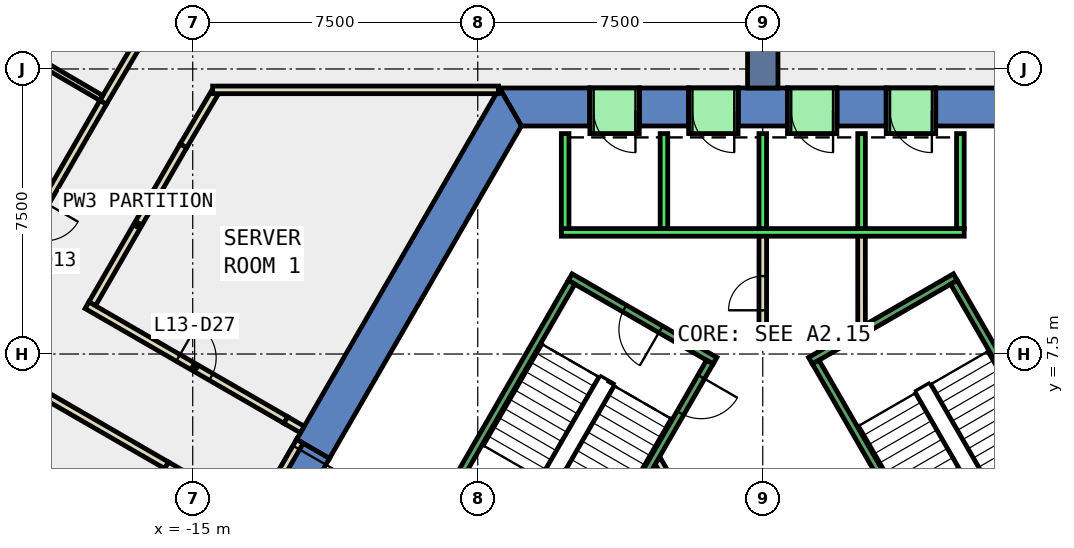
"""IFC4 building model, lengths in metres.
Left out: names, types, materials, properties, quantities, classifications, styles, units other than length and angle.
Written with IfcOpenShell. Run it as: python <this file> out.ifc"""

import sys

from ifc_helpers import new_model, si_unit, direction, frame, frame_2d, origin, place, context, subcontext, project, spatial, polyline, rectangle, outline, extrude, element, fill, save


model = new_model("IFC4")
c1 = context("Model", 3, precision=1e-05, world=origin(), true_north=direction((0.0, 1.0)))
c2 = subcontext(c1, "Body", "Model", "MODEL_VIEW")
j1 = project(units=[si_unit("LENGTHUNIT", "METRE"), si_unit("PLANEANGLEUNIT", "RADIAN")], contexts=[c1])
p1 = place(None, origin())
s1 = spatial("IfcSite", under=j1, at=p1, CompositionType="ELEMENT")
p2 = place(p1, origin())
s2 = spatial("IfcBuilding", under=s1, at=p2, CompositionType="ELEMENT")
p3 = place(p2, frame((0.0, 0.0, 64.4)))
s3 = spatial("IfcBuildingStorey", under=s2, at=p3, CompositionType="ELEMENT", Elevation=64.4)
p4 = place(p3, frame((0.0, 0.0, -0.4)))
e1 = element("IfcWall", 1, at=p4, inside=s3, PredefinedType="SHEAR", context=c2, shape_type="SweptSolid", body=[
    extrude(outline(polyline([(4.55, 14.5), (4.55, 13.5), (6.351, 13.5), (6.928, 14.5), (4.55, 14.5)])), origin(), (0.0, 0.0, 1.0), 4.2),
])
p5 = place(p3, frame((0.0, 0.0, -0.4)))
e2 = element("IfcWall", 2, at=p5, inside=s3, PredefinedType="SHEAR", context=c2, shape_type="SweptSolid", body=[
    extrude(outline(polyline([(1.95, 14.5), (1.95, 13.5), (3.25, 13.5), (3.25, 14.5), (1.95, 14.5)])), origin(), (0.0, 0.0, 1.0), 4.2),
])
p6 = place(p3, frame((0.0, 0.0, -0.4)))
e3 = element("IfcWall", 3, at=p6, inside=s3, PredefinedType="SHEAR", context=c2, shape_type="SweptSolid", body=[
    extrude(outline(polyline([(-0.65, 14.5), (-0.65, 13.5), (0.65, 13.5), (0.65, 14.5), (-0.65, 14.5)])), origin(), (0.0, 0.0, 1.0), 4.2),
])
p7 = place(p3, frame((0.0, 0.0, -0.4)))
e4 = element("IfcWall", 4, at=p7, inside=s3, PredefinedType="SHEAR", context=c2, shape_type="SweptSolid", body=[
    extrude(outline(polyline([(-3.25, 14.5), (-3.25, 13.5), (-1.95, 13.5), (-1.95, 14.5), (-3.25, 14.5)])), origin(), (0.0, 0.0, 1.0), 4.2),
])
p8 = place(p3, frame((0.0, 0.0, -0.4)))
e5 = element("IfcWall", 5, at=p8, inside=s3, PredefinedType="SHEAR", context=c2, shape_type="SweptSolid", body=[
    extrude(outline(polyline([(-4.55, 13.5), (-4.55, 14.5), (-6.928, 14.5), (-6.351, 13.5), (-4.55, 13.5)])), origin(), (0.0, 0.0, 1.0), 4.2),
])
p9 = place(p3, frame((0.0, 0.0, 3.6)))
e6 = element("IfcWall", 6, at=p9, inside=s3, PredefinedType="SHEAR", context=c2, shape_type="SweptSolid", body=[
    extrude(outline(polyline([(3.25, 14.5), (3.25, 13.5), (4.55, 13.5), (4.55, 14.5), (3.25, 14.5)])), origin(), (0.0, 0.0, 1.0), 0.2),
])
p10 = place(p3, frame((0.0, 0.0, 3.6)))
e7 = element("IfcWall", 7, at=p10, inside=s3, PredefinedType="SHEAR", context=c2, shape_type="SweptSolid", body=[
    extrude(outline(polyline([(0.65, 14.5), (0.65, 13.5), (1.95, 13.5), (1.95, 14.5), (0.65, 14.5)])), origin(), (0.0, 0.0, 1.0), 0.2),
])
p11 = place(p3, frame((0.0, 0.0, 3.6)))
e8 = element("IfcWall", 8, at=p11, inside=s3, PredefinedType="SHEAR", context=c2, shape_type="SweptSolid", body=[
    extrude(outline(polyline([(-1.95, 14.5), (-1.95, 13.5), (-0.65, 13.5), (-0.65, 14.5), (-1.95, 14.5)])), origin(), (0.0, 0.0, 1.0), 0.2),
])
p12 = place(p3, frame((0.0, 0.0, 3.6)))
e9 = element("IfcWall", 9, at=p12, inside=s3, PredefinedType="SHEAR", context=c2, shape_type="SweptSolid", body=[
    extrude(outline(polyline([(-4.55, 14.5), (-4.55, 13.5), (-3.25, 13.5), (-3.25, 14.5), (-4.55, 14.5)])), origin(), (0.0, 0.0, 1.0), 0.2),
])
p13 = place(p3, frame((0.0, 0.0, -0.4)))
e10 = element("IfcWall", 10, at=p13, inside=s3, PredefinedType="SHEAR", context=c2, shape_type="SweptSolid", body=[
    extrude(outline(polyline([(-12.267, 5.252), (-11.402, 4.752), (-6.351, 13.5), (-6.928, 14.5), (-12.267, 5.252)])), origin(), (0.0, 0.0, 1.0), 4.2),
])
p14 = place(p3, frame((0.0, 0.0, 3.6)))
e11 = element("IfcWall", 11, at=p14, inside=s3, PredefinedType="SHEAR", context=c2, shape_type="SweptSolid", body=[
    extrude(outline(polyline([(-13.267, 3.52), (-12.402, 3.02), (-11.402, 4.752), (-12.267, 5.252), (-13.267, 3.52)])), origin(), (0.0, 0.0, 1.0), 0.2),
])
p15 = place(p3, frame((0.0, 14.5, -0.4), z_axis=(0.0, 0.0, 1.0), x_axis=(0.0, 1.0, 0.0)))
e12 = element("IfcWall", 12, at=p15, inside=s3, PredefinedType="SHEAR", context=c2, shape_type="SweptSolid", body=[
    extrude(rectangle(XDim=9.0, YDim=0.8, at=frame_2d((4.5, 0.0))), origin(), (0.0, 0.0, 1.0), 4.2),
])
p16 = place(p3, frame((-14.427, 14.364, 0.0), z_axis=(0.0, 0.0, 1.0), x_axis=(-0.508509719672, -0.861056249614, 0.0)))
e13 = element("IfcWall", 13, at=p16, inside=s3, PredefinedType="PARTITIONING", context=c2, shape_type="SweptSolid", body=[
    extrude(rectangle(XDim=1.611, YDim=0.2, at=frame_2d((0.805, 0.0))), origin(), (0.0, 0.0, 1.0), 3.8),
])
p17 = place(p3, frame((-15.246, 12.977, 0.0), z_axis=(0.0, 0.0, 1.0), x_axis=(-0.499891203561, -0.866088208327, 0.0)))
e14 = element("IfcWall", 14, at=p17, inside=s3, PredefinedType="PARTITIONING", context=c2, shape_type="SweptSolid", body=[
    extrude(rectangle(XDim=4.801, YDim=0.2, at=frame_2d((2.4, 0.0))), origin(), (0.0, 0.0, 1.0), 3.8),
])
p18 = place(p3, frame((-17.783, 8.783, 0.0), z_axis=(0.0, 0.0, 1.0), x_axis=(0.866041598752, -0.499971948444, 0.0)))
e15 = element("IfcWall", 15, at=p18, inside=s3, PredefinedType="PARTITIONING", context=c2, shape_type="SweptSolid", body=[
    extrude(rectangle(XDim=6.042, YDim=0.2, at=frame_2d((3.021, 0.0))), origin(), (0.0, 0.0, 1.0), 3.8),
])
p19 = place(p18, frame((2.771, 0.0, 0.0)))
e16 = element("IfcOpeningElement", 16, at=p19, cuts=e15, PredefinedType="OPENING", context=c2, shape_type="SweptSolid", body=[
    extrude(rectangle(XDim=1.0, YDim=2.1, at=frame_2d((0.5, 1.05))), frame((0.0, 0.11, 0.0), z_axis=(0.0, -1.0, 0.0), x_axis=(1.0, 0.0, 0.0)), (0.0, 0.0, 1.0), 0.22),
])
p20 = place(p3, frame((-15.687, 4.571, 0.0), z_axis=(0.0, 0.0, 1.0), x_axis=(-0.866044530317, 0.49996687041, 0.0)))
e17 = element("IfcWall", 17, at=p20, inside=s3, PredefinedType="PARTITIONING", context=c2, shape_type="SweptSolid", body=[
    extrude(rectangle(XDim=3.718, YDim=0.2, at=frame_2d((1.859, 0.0))), origin(), (0.0, 0.0, 1.0), 3.8),
])
p21 = place(p3, frame((-17.357, 14.122, 0.0), z_axis=(0.0, 0.0, 1.0), x_axis=(0.508298575594, 0.861180909014, 0.0)))
e18 = element("IfcWall", 18, at=p21, inside=s3, PredefinedType="PARTITIONING", context=c2, shape_type="SweptSolid", body=[
    extrude(rectangle(XDim=7.258, YDim=0.2, at=frame_2d((3.629, 0.0))), origin(), (0.0, 0.0, 1.0), 3.8),
])
p22 = place(p21, frame((3.204, 0.0, 0.0)))
e19 = element("IfcOpeningElement", 19, at=p22, cuts=e18, PredefinedType="OPENING", context=c2, shape_type="SweptSolid", body=[
    extrude(rectangle(XDim=1.0, YDim=2.1, at=frame_2d((0.5, 1.05))), frame((0.0, 0.11, 0.0), z_axis=(0.0, -1.0, 0.0), x_axis=(1.0, 0.0, 0.0)), (0.0, 0.0, 1.0), 0.22),
])
p23 = place(p3, frame((-17.356, 14.122, 0.0), z_axis=(0.0, 0.0, 1.0), x_axis=(-0.499946764175, -0.866056137321, 0.0)))
e20 = element("IfcWall", 20, at=p23, inside=s3, PredefinedType="PARTITIONING", context=c2, shape_type="SweptSolid", body=[
    extrude(rectangle(XDim=7.255, YDim=0.2, at=frame_2d((3.627, 0.0))), origin(), (0.0, 0.0, 1.0), 3.8),
])
p24 = place(p23, frame((3.052, 0.0, 0.0)))
e21 = element("IfcOpeningElement", 21, at=p24, cuts=e20, PredefinedType="OPENING", context=c2, shape_type="SweptSolid", body=[
    extrude(rectangle(XDim=1.0, YDim=2.1, at=frame_2d((0.5, 1.05))), frame((0.0, 0.11, 0.0), z_axis=(0.0, -1.0, 0.0), x_axis=(1.0, 0.0, 0.0)), (0.0, 0.0, 1.0), 0.22),
])
p25 = place(p3, frame((1.88, 7.8, 0.0), z_axis=(0.0, 0.0, 1.0), x_axis=(-1.0, 0.0, 0.0)))
e22 = element("IfcWall", 22, at=p25, inside=s3, PredefinedType="PARTITIONING", context=c2, shape_type="SweptSolid", body=[
    extrude(rectangle(XDim=1.78, YDim=0.2, at=frame_2d((0.89, 0.0))), origin(), (0.0, 0.0, 1.0), 3.8),
])
p26 = place(p3, frame((0.0, 7.7, 0.0), z_axis=(0.0, 0.0, 1.0), x_axis=(0.000325520816, 0.999999947018, 0.0)))
e23 = element("IfcWall", 23, at=p26, inside=s3, PredefinedType="PARTITIONING", context=c2, shape_type="SweptSolid", body=[
    extrude(rectangle(XDim=3.0, YDim=0.2, at=frame_2d((1.5, 0.0))), origin(), (0.0, 0.0, 1.0), 3.8),
])
p27 = place(p26, frame((0.95, 0.0, 0.0)))
e24 = element("IfcOpeningElement", 24, at=p27, cuts=e23, PredefinedType="OPENING", context=c2, shape_type="SweptSolid", body=[
    extrude(rectangle(XDim=0.9, YDim=2.1, at=frame_2d((0.45, 1.05))), frame((0.0, 0.11, 0.0), z_axis=(0.0, -1.0, 0.0), x_axis=(1.0, 0.0, 0.0)), (0.0, 0.0, 1.0), 0.22),
])
p28 = place(p3, frame((2.599, 10.7, 0.0), z_axis=(0.0, 0.0, 1.0), x_axis=(0.000393159002, -0.999999922713, 0.0)))
e25 = element("IfcWall", 25, at=p28, inside=s3, PredefinedType="PARTITIONING", context=c2, shape_type="SweptSolid", body=[
    extrude(rectangle(XDim=2.484, YDim=0.2, at=frame_2d((1.242, 0.0))), origin(), (0.0, 0.0, 1.0), 3.8),
])
p29 = place(p3, frame((-6.957, 14.45, 0.0), z_axis=(0.0, 0.0, 1.0), x_axis=(-1.0, 0.0, 0.0)))
e26 = element("IfcWall", 26, at=p29, inside=s3, PredefinedType="PARTITIONING", context=c2, shape_type="SweptSolid", body=[
    extrude(rectangle(XDim=7.519, YDim=0.2, at=frame_2d((3.76, 0.0))), origin(), (0.0, 0.0, 1.0), 3.8),
])
p30 = place(p3, frame((-2.771, 4.7, 0.0), z_axis=(0.0, 0.0, 1.0), x_axis=(0.499969479948, -0.866043023828, 0.0)))
e27 = element("IfcWall", 27, at=p30, inside=s3, PredefinedType="PARTITIONING", context=c2, shape_type="SweptSolid", body=[
    extrude(rectangle(XDim=4.99, YDim=0.2, at=frame_2d((2.495, 0.0))), origin(), (0.0, 0.0, 1.0), 3.8),
])
p31 = place(p30, frame((1.945, 0.0, 0.0)))
e28 = element("IfcOpeningElement", 28, at=p31, cuts=e27, PredefinedType="OPENING", context=c2, shape_type="SweptSolid", body=[
    extrude(rectangle(XDim=1.0, YDim=2.1, at=frame_2d((0.5, 1.05))), frame((0.0, 0.11, 0.0), z_axis=(0.0, -1.0, 0.0), x_axis=(1.0, 0.0, 0.0)), (0.0, 0.0, 1.0), 0.22),
])
p32 = place(p3, frame((-15.724, 4.534, 0.0), z_axis=(0.0, 0.0, 1.0), x_axis=(0.500195085719, -0.865912741691, 0.0)))
e29 = element("IfcWall", 29, at=p32, inside=s3, PredefinedType="PARTITIONING", context=c2, shape_type="SweptSolid", body=[
    extrude(rectangle(XDim=1.282, YDim=0.2, at=frame_2d((0.641, 0.0))), origin(), (0.0, 0.0, 1.0), 3.8),
])
p33 = place(p3, frame((-17.405, 14.237, 0.0), z_axis=(0.0, 0.0, 1.0), x_axis=(-0.863614048932, 0.504153522736, 0.0)))
e30 = element("IfcWall", 30, at=p33, inside=s3, PredefinedType="PARTITIONING", context=c2, shape_type="SweptSolid", body=[
    extrude(rectangle(XDim=5.48, YDim=0.15, at=frame_2d((2.74, 0.0))), origin(), (0.0, 0.0, 1.0), 3.8),
])
p34 = place(p3, frame((-12.18, 5.202, 0.0), z_axis=(0.0, 0.0, 1.0), x_axis=(-0.50002537861, -0.866010750942, 0.0)))
e31 = element("IfcWall", 31, at=p34, inside=s3, PredefinedType="PARTITIONING", context=c2, shape_type="SweptSolid", body=[
    extrude(rectangle(XDim=2.0, YDim=0.2, at=frame_2d((1.0, 0.0))), origin(), (0.0, 0.0, 1.0), 2.4),
])
p35 = place(p34, frame((0.19, 0.0, 0.0)))
e32 = element("IfcOpeningElement", 32, at=p35, cuts=e31, PredefinedType="OPENING", context=c2, shape_type="SweptSolid", body=[
    extrude(rectangle(XDim=1.8, YDim=2.1, at=frame_2d((0.9, 1.05))), frame((0.0, 0.11, 0.0), z_axis=(0.0, -1.0, 0.0), x_axis=(1.0, 0.0, 0.0)), (0.0, 0.0, 1.0), 0.22),
])
p36 = place(p3, frame((-12.55, 5.762, 0.0), z_axis=(0.0, 0.0, 1.0), x_axis=(0.866071776036, -0.499919672301, 0.0)))
e33 = element("IfcWall", 33, at=p36, inside=s3, PredefinedType="PARTITIONING", context=c2, shape_type="SweptSolid", body=[
    extrude(rectangle(XDim=0.5, YDim=0.2, at=frame_2d((0.25, 0.0))), origin(), (0.0, 0.0, 1.0), 2.4),
])
p37 = place(p3, frame((-13.85, 3.51, 0.0), z_axis=(0.0, 0.0, 1.0), x_axis=(-0.865924890849, 0.500174053114, 0.0)))
e34 = element("IfcWall", 34, at=p37, inside=s3, PredefinedType="PARTITIONING", context=c2, shape_type="SweptSolid", body=[
    extrude(rectangle(XDim=2.121, YDim=0.2, at=frame_2d((1.061, 0.0))), origin(), (0.0, 0.0, 1.0), 3.8),
])
p38 = place(p3, frame((5.3, 10.7, 0.0), z_axis=(0.0, 0.0, 1.0), x_axis=(-1.0, 0.0, 0.0)))
e35 = element("IfcWall", 35, at=p38, inside=s3, PredefinedType="STANDARD", context=c2, shape_type="SweptSolid", body=[
    extrude(rectangle(XDim=10.6, YDim=0.2, at=frame_2d((5.3, 0.0))), origin(), (0.0, 0.0, 1.0), 3.8),
])
for number, where, z_axis, x_axis in (
    (36, (5.2, 10.8, 0.0), (0.0, 0.0, 1.0), (0.0, 1.0, 0.0)),
    (37, (2.6, 10.8, 0.0), (0.0, 0.0, 1.0), (0.0, 1.0, 0.0)),
    (38, (0.0, 10.8, 0.0), (0.0, 0.0, 1.0), (0.0, 1.0, 0.0)),
    (39, (-2.6, 10.8, 0.0), (0.0, 0.0, 1.0), (0.0, 1.0, 0.0)),
    (40, (-5.2, 10.8, 0.0), (0.0, 0.0, 1.0), (0.0, 1.0, 0.0)),
):
    element("IfcWall", number, at=place(p3, frame(where, z_axis=z_axis, x_axis=x_axis)), inside=s3, PredefinedType="STANDARD", context=c2, shape_type="SweptSolid", body=[
        extrude(rectangle(XDim=2.5, YDim=0.2, at=frame_2d((1.25, 0.0))), origin(), (0.0, 0.0, 1.0), 3.8),
    ])
p39 = place(p3, frame((4.55, 13.9, 0.0), z_axis=(0.0, 0.0, 1.0), x_axis=(-1.0, 0.0, 0.0)))
e41 = element("IfcWall", 41, at=p39, inside=s3, PredefinedType="STANDARD", context=c2, shape_type="SweptSolid", body=[
    extrude(rectangle(XDim=1.3, YDim=1.2, at=frame_2d((0.65, 0.0))), origin(), (0.0, 0.0, 1.0), 2.4),
])
p40 = place(p39, frame((0.1, 0.0, 0.0)))
e42 = element("IfcOpeningElement", 42, at=p40, cuts=e41, PredefinedType="OPENING", context=c2, shape_type="SweptSolid", body=[
    extrude(rectangle(XDim=1.1, YDim=2.3, at=frame_2d((0.55, 1.15))), frame((0.0, 0.61, 0.0), z_axis=(0.0, -1.0, 0.0), x_axis=(1.0, 0.0, 0.0)), (0.0, 0.0, 1.0), 1.22),
])
p41 = place(p3, frame((1.95, 13.9, 0.0), z_axis=(0.0, 0.0, 1.0), x_axis=(-1.0, 0.0, 0.0)))
e43 = element("IfcWall", 43, at=p41, inside=s3, PredefinedType="STANDARD", context=c2, shape_type="SweptSolid", body=[
    extrude(rectangle(XDim=1.3, YDim=1.2, at=frame_2d((0.65, 0.0))), origin(), (0.0, 0.0, 1.0), 2.4),
])
p42 = place(p41, frame((0.1, 0.0, 0.0)))
e44 = element("IfcOpeningElement", 44, at=p42, cuts=e43, PredefinedType="OPENING", context=c2, shape_type="SweptSolid", body=[
    extrude(rectangle(XDim=1.1, YDim=2.3, at=frame_2d((0.55, 1.15))), frame((0.0, 0.61, 0.0), z_axis=(0.0, -1.0, 0.0), x_axis=(1.0, 0.0, 0.0)), (0.0, 0.0, 1.0), 1.22),
])
p43 = place(p3, frame((-0.65, 13.9, 0.0), z_axis=(0.0, 0.0, 1.0), x_axis=(-1.0, 0.0, 0.0)))
e45 = element("IfcWall", 45, at=p43, inside=s3, PredefinedType="STANDARD", context=c2, shape_type="SweptSolid", body=[
    extrude(rectangle(XDim=1.3, YDim=1.2, at=frame_2d((0.65, 0.0))), origin(), (0.0, 0.0, 1.0), 2.4),
])
p44 = place(p43, frame((0.1, 0.0, 0.0)))
e46 = element("IfcOpeningElement", 46, at=p44, cuts=e45, PredefinedType="OPENING", context=c2, shape_type="SweptSolid", body=[
    extrude(rectangle(XDim=1.1, YDim=2.3, at=frame_2d((0.55, 1.15))), frame((0.0, 0.61, 0.0), z_axis=(0.0, -1.0, 0.0), x_axis=(1.0, 0.0, 0.0)), (0.0, 0.0, 1.0), 1.22),
])
p45 = place(p3, frame((-3.25, 13.9, 0.0), z_axis=(0.0, 0.0, 1.0), x_axis=(-1.0, 0.0, 0.0)))
e47 = element("IfcWall", 47, at=p45, inside=s3, PredefinedType="STANDARD", context=c2, shape_type="SweptSolid", body=[
    extrude(rectangle(XDim=1.3, YDim=1.2, at=frame_2d((0.65, 0.0))), origin(), (0.0, 0.0, 1.0), 2.4),
])
p46 = place(p45, frame((0.1, 0.0, 0.0)))
e48 = element("IfcOpeningElement", 48, at=p46, cuts=e47, PredefinedType="OPENING", context=c2, shape_type="SweptSolid", body=[
    extrude(rectangle(XDim=1.1, YDim=2.3, at=frame_2d((0.55, 1.15))), frame((0.0, 0.61, 0.0), z_axis=(0.0, -1.0, 0.0), x_axis=(1.0, 0.0, 0.0)), (0.0, 0.0, 1.0), 1.22),
])
p47 = place(p3, frame((1.256, 7.324, 0.0), z_axis=(0.0, 0.0, 1.0), x_axis=(0.866046073146, 0.499964197906, 0.0)))
e49 = element("IfcWall", 49, at=p47, inside=s3, PredefinedType="STANDARD", context=c2, shape_type="SweptSolid", body=[
    extrude(rectangle(XDim=4.4, YDim=0.2, at=frame_2d((2.2, 0.0))), origin(), (0.0, 0.0, 1.0), 3.8),
])
p48 = place(p3, frame((4.843, 1.312, 0.0), z_axis=(0.0, 0.0, 1.0), x_axis=(-0.499963383562, 0.866046543262, 0.0)))
e50 = element("IfcWall", 50, at=p48, inside=s3, PredefinedType="STANDARD", context=c2, shape_type="SweptSolid", body=[
    extrude(rectangle(XDim=6.9, YDim=0.2, at=frame_2d((3.45, 0.0))), origin(), (0.0, 0.0, 1.0), 3.8),
])
p49 = place(p48, frame((0.45, 0.0, 0.0)))
e51 = element("IfcOpeningElement", 51, at=p49, cuts=e50, PredefinedType="OPENING", context=c2, shape_type="SweptSolid", body=[
    extrude(rectangle(XDim=1.1, YDim=2.2, at=frame_2d((0.55, 1.1))), frame((0.0, 0.11, 0.0), z_axis=(0.0, -1.0, 0.0), x_axis=(1.0, 0.0, 0.0)), (0.0, 0.0, 1.0), 0.22),
])
p50 = place(p3, frame((8.48, 3.412, 0.0), z_axis=(0.0, 0.0, 1.0), x_axis=(-0.499978703459, 0.866037698999, 0.0)))
e52 = element("IfcWall", 52, at=p50, inside=s3, PredefinedType="STANDARD", context=c2, shape_type="SweptSolid", body=[
    extrude(rectangle(XDim=6.9, YDim=0.2, at=frame_2d((3.45, 0.0))), origin(), (0.0, 0.0, 1.0), 3.8),
])
p51 = place(p3, frame((-1.256, 7.324, 0.0), z_axis=(0.0, 0.0, 1.0), x_axis=(-0.866046073146, 0.499964197906, 0.0)))
e53 = element("IfcWall", 53, at=p51, inside=s3, PredefinedType="STANDARD", context=c2, shape_type="SweptSolid", body=[
    extrude(rectangle(XDim=4.4, YDim=0.2, at=frame_2d((2.2, 0.0))), origin(), (0.0, 0.0, 1.0), 3.8),
])
p52 = place(p51, frame((1.65, 0.0, 0.0)))
e54 = element("IfcOpeningElement", 54, at=p52, cuts=e53, PredefinedType="OPENING", context=c2, shape_type="SweptSolid", body=[
    extrude(rectangle(XDim=1.1, YDim=2.2, at=frame_2d((0.55, 1.1))), frame((0.0, 0.11, 0.0), z_axis=(0.0, -1.0, 0.0), x_axis=(1.0, 0.0, 0.0)), (0.0, 0.0, 1.0), 0.22),
])
p53 = place(p3, frame((-1.393, 7.288, 0.0), z_axis=(0.0, 0.0, 1.0), x_axis=(-0.499963383562, -0.866046543262, 0.0)))
e55 = element("IfcWall", 55, at=p53, inside=s3, PredefinedType="STANDARD", context=c2, shape_type="SweptSolid", body=[
    extrude(rectangle(XDim=6.9, YDim=0.2, at=frame_2d((3.45, 0.0))), origin(), (0.0, 0.0, 1.0), 3.8),
])
p54 = place(p53, frame((0.45, 0.0, 0.0)))
e56 = element("IfcOpeningElement", 56, at=p54, cuts=e55, PredefinedType="OPENING", context=c2, shape_type="SweptSolid", body=[
    extrude(rectangle(XDim=1.1, YDim=2.2, at=frame_2d((0.55, 1.1))), frame((0.0, 0.11, 0.0), z_axis=(0.0, -1.0, 0.0), x_axis=(1.0, 0.0, 0.0)), (0.0, 0.0, 1.0), 0.22),
])
p55 = place(p3, frame((-5.03, 9.388, 0.0), z_axis=(0.0, 0.0, 1.0), x_axis=(-0.499978703459, -0.866037698999, 0.0)))
e57 = element("IfcWall", 57, at=p55, inside=s3, PredefinedType="STANDARD", context=c2, shape_type="SweptSolid", body=[
    extrude(rectangle(XDim=6.9, YDim=0.2, at=frame_2d((3.45, 0.0))), origin(), (0.0, 0.0, 1.0), 3.8),
])
p56 = place(p19, origin())
e58 = element("IfcDoor", 58, at=p56, inside=s3, OperationType="SINGLE_SWING_LEFT", PredefinedType="DOOR", context=c2, shape_type="SweptSolid", body=[
    extrude(rectangle(XDim=1.0, YDim=2.1, at=frame_2d((0.5, 1.05))), frame((0.0, 0.025, 0.0), z_axis=(0.0, -1.0, 0.0), x_axis=(1.0, 0.0, 0.0)), (0.0, 0.0, 1.0), 0.05),
])
fill(e16, e58)
p57 = place(p27, origin())
e59 = element("IfcDoor", 59, at=p57, inside=s3, OperationType="SINGLE_SWING_RIGHT", PredefinedType="DOOR", context=c2, shape_type="SweptSolid", body=[
    extrude(rectangle(XDim=0.9, YDim=2.1, at=frame_2d((0.45, 1.05))), frame((0.0, 0.025, 0.0), z_axis=(0.0, -1.0, 0.0), x_axis=(1.0, 0.0, 0.0)), (0.0, 0.0, 1.0), 0.05),
])
fill(e24, e59)
p58 = place(p35, origin())
e60 = element("IfcDoor", 60, at=p58, inside=s3, OperationType="DOUBLE_DOOR_SINGLE_SWING", PredefinedType="DOOR", context=c2, shape_type="SweptSolid", body=[
    extrude(rectangle(XDim=1.8, YDim=2.1, at=frame_2d((0.9, 1.05))), frame((0.0, 0.025, 0.0), z_axis=(0.0, -1.0, 0.0), x_axis=(1.0, 0.0, 0.0)), (0.0, 0.0, 1.0), 0.05),
])
fill(e32, e60)
p59 = place(p40, origin())
e61 = element("IfcDoor", 61, at=p59, inside=s3, OperationType="SLIDING_TO_LEFT", PredefinedType="DOOR", context=c2, shape_type="SweptSolid", body=[
    extrude(rectangle(XDim=1.1, YDim=2.3, at=frame_2d((0.55, 1.15))), frame((0.0, 0.025, 0.0), z_axis=(0.0, -1.0, 0.0), x_axis=(1.0, 0.0, 0.0)), (0.0, 0.0, 1.0), 0.05),
])
fill(e42, e61)
p60 = place(p42, origin())
e62 = element("IfcDoor", 62, at=p60, inside=s3, OperationType="SLIDING_TO_LEFT", PredefinedType="DOOR", context=c2, shape_type="SweptSolid", body=[
    extrude(rectangle(XDim=1.1, YDim=2.3, at=frame_2d((0.55, 1.15))), frame((0.0, 0.025, 0.0), z_axis=(0.0, -1.0, 0.0), x_axis=(1.0, 0.0, 0.0)), (0.0, 0.0, 1.0), 0.05),
])
fill(e44, e62)
p61 = place(p44, origin())
e63 = element("IfcDoor", 63, at=p61, inside=s3, OperationType="SLIDING_TO_LEFT", PredefinedType="DOOR", context=c2, shape_type="SweptSolid", body=[
    extrude(rectangle(XDim=1.1, YDim=2.3, at=frame_2d((0.55, 1.15))), frame((0.0, 0.025, 0.0), z_axis=(0.0, -1.0, 0.0), x_axis=(1.0, 0.0, 0.0)), (0.0, 0.0, 1.0), 0.05),
])
fill(e46, e63)
p62 = place(p46, origin())
e64 = element("IfcDoor", 64, at=p62, inside=s3, OperationType="SLIDING_TO_LEFT", PredefinedType="DOOR", context=c2, shape_type="SweptSolid", body=[
    extrude(rectangle(XDim=1.1, YDim=2.3, at=frame_2d((0.55, 1.15))), frame((0.0, 0.025, 0.0), z_axis=(0.0, -1.0, 0.0), x_axis=(1.0, 0.0, 0.0)), (0.0, 0.0, 1.0), 0.05),
])
fill(e48, e64)
p63 = place(p54, origin())
e65 = element("IfcDoor", 65, at=p63, inside=s3, OperationType="SINGLE_SWING_LEFT", PredefinedType="DOOR", context=c2, shape_type="SweptSolid", body=[
    extrude(rectangle(XDim=1.1, YDim=2.2, at=frame_2d((0.55, 1.1))), frame((0.0, 0.025, 0.0), z_axis=(0.0, -1.0, 0.0), x_axis=(1.0, 0.0, 0.0)), (0.0, 0.0, 1.0), 0.05),
])
fill(e56, e65)
p64 = place(p52, origin())
e66 = element("IfcDoor", 66, at=p64, inside=s3, OperationType="SINGLE_SWING_LEFT", PredefinedType="DOOR", context=c2, shape_type="SweptSolid", body=[
    extrude(rectangle(XDim=1.1, YDim=2.2, at=frame_2d((0.55, 1.1))), frame((0.0, 0.025, 0.0), z_axis=(0.0, -1.0, 0.0), x_axis=(1.0, 0.0, 0.0)), (0.0, 0.0, 1.0), 0.05),
])
fill(e54, e66)
save(model, sys.argv[1])
